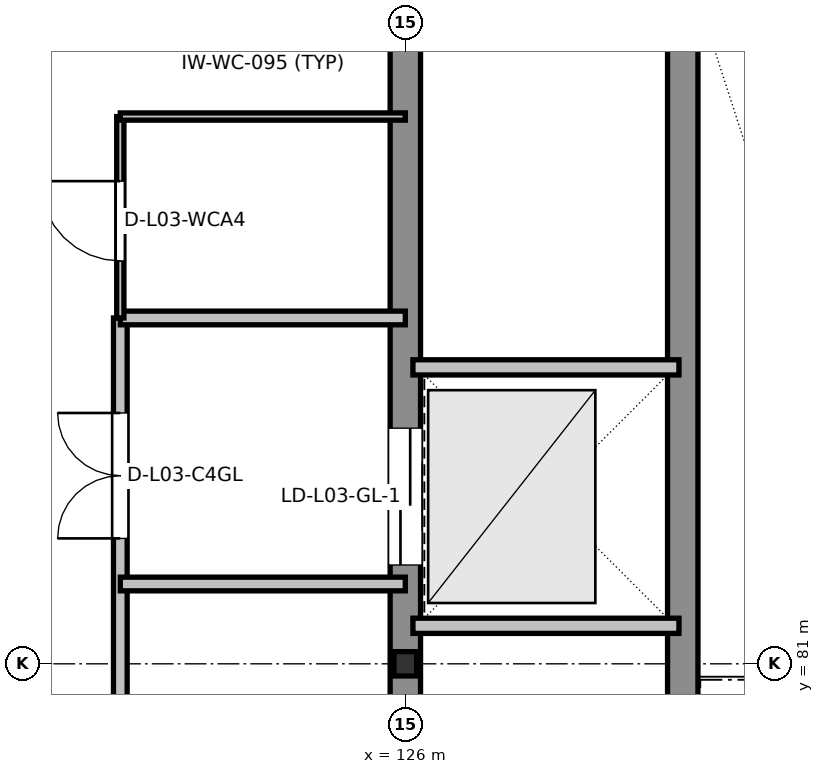
"""IFC4 building model, lengths in metres.
Left out: names, types, materials, properties, quantities, classifications, styles, units other than length and angle.
Written with IfcOpenShell. Run it as: python <this file> out.ifc"""

import sys

from ifc_helpers import new_model, si_unit, direction, frame, frame_2d, origin, origin_2d, place, context, subcontext, project, spatial, rectangle, i_section, extrude, element, fill, save


model = new_model("IFC4")
c1 = context("Model", 3, precision=1e-05, world=origin(), true_north=direction((0.0, 1.0)))
c2 = subcontext(c1, "Body", "Model", "MODEL_VIEW")
j1 = project(units=[si_unit("LENGTHUNIT", "METRE"), si_unit("PLANEANGLEUNIT", "RADIAN")], contexts=[c1])
p1 = place(None, origin())
s1 = spatial("IfcSite", under=j1, at=p1, CompositionType="ELEMENT")
p2 = place(p1, origin())
s2 = spatial("IfcBuilding", under=s1, at=p2, CompositionType="ELEMENT")
p3 = place(p2, frame((0.0, 0.0, 15.0)))
s3 = spatial("IfcBuildingStorey", under=s2, at=p3, CompositionType="ELEMENT", Elevation=15.0)
p4 = place(p3, frame((126.0, 81.0, 0.0), z_axis=(0.0, 0.0, 1.0), x_axis=(1.0, 0.0, 0.0)))
e1 = element("IfcColumn", 1, at=p4, inside=s3, PredefinedType="COLUMN", context=c2, shape_type="SweptSolid", body=[
    extrude(i_section(OverallWidth=0.3, OverallDepth=0.32, WebThickness=0.011, FlangeThickness=0.021, at=origin_2d()), origin(), (0.0, 0.0, 1.0), 4.2),
])
p5 = place(p3, frame((126.0, 90.0, 0.0), z_axis=(0.0, 0.0, 1.0), x_axis=(0.0, -1.0, 0.0)))
e2 = element("IfcWall", 2, at=p5, inside=s3, PredefinedType="SHEAR", context=c2, shape_type="SweptSolid", body=[
    extrude(rectangle(XDim=18.0, YDim=0.4, at=frame_2d((9.0, 0.0))), origin(), (0.0, 0.0, 1.0), 3.96),
])
p6 = place(p5, frame((16.1, 0.0, 0.0)))
e3 = element("IfcOpeningElement", 3, at=p6, cuts=e2, PredefinedType="OPENING", context=c2, shape_type="SweptSolid", body=[
    extrude(rectangle(XDim=1.1, YDim=2.16, at=frame_2d((0.55, 1.08))), frame((0.0, 0.21, 0.0), z_axis=(0.0, -1.0, 0.0), x_axis=(1.0, 0.0, 0.0)), (0.0, 0.0, 1.0), 0.42),
])
p7 = place(p5, frame((13.45, 0.0, 0.0)))
e4 = element("IfcOpeningElement", 4, at=p7, cuts=e2, PredefinedType="OPENING", context=c2, shape_type="SweptSolid", body=[
    extrude(rectangle(XDim=1.2, YDim=2.2, at=frame_2d((0.6, 1.1))), frame((0.0, 0.21, 0.0), z_axis=(0.0, -1.0, 0.0), x_axis=(1.0, 0.0, 0.0)), (0.0, 0.0, 1.0), 0.42),
])
p8 = place(p5, frame((10.65, 0.0, 0.0)))
e5 = element("IfcOpeningElement", 5, at=p8, cuts=e2, PredefinedType="OPENING", context=c2, shape_type="SweptSolid", body=[
    extrude(rectangle(XDim=1.2, YDim=2.2, at=frame_2d((0.6, 1.1))), frame((0.0, 0.21, 0.0), z_axis=(0.0, -1.0, 0.0), x_axis=(1.0, 0.0, 0.0)), (0.0, 0.0, 1.0), 0.42),
])
p9 = place(p5, frame((5.9, 0.0, 0.0)))
e6 = element("IfcOpeningElement", 6, at=p9, cuts=e2, PredefinedType="OPENING", context=c2, shape_type="SweptSolid", body=[
    extrude(rectangle(XDim=1.8, YDim=2.35, at=frame_2d((0.9, 1.175))), frame((0.0, 0.21, 0.0), z_axis=(0.0, -1.0, 0.0), x_axis=(1.0, 0.0, 0.0)), (0.0, 0.0, 1.0), 0.42),
])
p10 = place(p3, frame((129.65, 72.0, 0.0), z_axis=(0.0, 0.0, 1.0), x_axis=(0.0, 1.0, 0.0)))
e7 = element("IfcWall", 7, at=p10, inside=s3, PredefinedType="SHEAR", context=c2, shape_type="SweptSolid", body=[
    extrude(rectangle(XDim=18.0, YDim=0.4, at=frame_2d((9.0, 0.0))), origin(), (0.0, 0.0, 1.0), 3.96),
])
p11 = place(p10, frame((0.7, 0.0, 0.0)))
e8 = element("IfcOpeningElement", 8, at=p11, cuts=e7, PredefinedType="OPENING", context=c2, shape_type="SweptSolid", body=[
    extrude(rectangle(XDim=1.1, YDim=2.16, at=frame_2d((0.55, 1.08))), frame((0.0, 0.21, 0.0), z_axis=(0.0, -1.0, 0.0), x_axis=(1.0, 0.0, 0.0)), (0.0, 0.0, 1.0), 0.42),
])
for number, where, z_axis, x_axis in (
    (9, (126.1, 81.5, 0.0), (0.0, 0.0, 1.0), (1.0, 0.0, 0.0)),
    (10, (126.1, 84.9, 0.0), (0.0, 0.0, 1.0), (1.0, 0.0, 0.0)),
):
    element("IfcWall", number, at=place(p3, frame(where, z_axis=z_axis, x_axis=x_axis)), inside=s3, PredefinedType="PARTITIONING", context=c2, shape_type="SweptSolid", body=[
        extrude(rectangle(XDim=3.5, YDim=0.2, at=frame_2d((1.75, 0.0))), origin(), (0.0, 0.0, 1.0), 3.96),
    ])
p12 = place(p3, frame((122.25, 72.0, 0.0), z_axis=(0.0, 0.0, 1.0), x_axis=(0.0, 1.0, 0.0)))
e11 = element("IfcWall", 11, at=p12, inside=s3, PredefinedType="PARTITIONING", context=c2, shape_type="SweptSolid", body=[
    extrude(rectangle(XDim=13.55, YDim=0.18, at=frame_2d((6.775, 0.0))), origin(), (0.0, 0.0, 1.0), 3.96),
])
p13 = place(p12, frame((0.75, 0.0, 0.0)))
e12 = element("IfcOpeningElement", 12, at=p13, cuts=e11, PredefinedType="OPENING", context=c2, shape_type="SweptSolid", body=[
    extrude(rectangle(XDim=1.1, YDim=2.16, at=frame_2d((0.55, 1.08))), frame((0.0, 0.1, 0.0), z_axis=(0.0, -1.0, 0.0), x_axis=(1.0, 0.0, 0.0)), (0.0, 0.0, 1.0), 0.2),
])
p14 = place(p12, frame((3.2, 0.0, 0.0)))
e13 = element("IfcOpeningElement", 13, at=p14, cuts=e11, PredefinedType="OPENING", context=c2, shape_type="SweptSolid", body=[
    extrude(rectangle(XDim=1.4, YDim=2.2, at=frame_2d((0.7, 1.1))), frame((0.0, 0.1, 0.0), z_axis=(0.0, -1.0, 0.0), x_axis=(1.0, 0.0, 0.0)), (0.0, 0.0, 1.0), 0.2),
])
p15 = place(p12, frame((6.65, 0.0, 0.0)))
e14 = element("IfcOpeningElement", 14, at=p15, cuts=e11, PredefinedType="OPENING", context=c2, shape_type="SweptSolid", body=[
    extrude(rectangle(XDim=1.4, YDim=2.2, at=frame_2d((0.7, 1.1))), frame((0.0, 0.1, 0.0), z_axis=(0.0, -1.0, 0.0), x_axis=(1.0, 0.0, 0.0)), (0.0, 0.0, 1.0), 0.2),
])
p16 = place(p12, frame((10.65, 0.0, 0.0)))
e15 = element("IfcOpeningElement", 15, at=p16, cuts=e11, PredefinedType="OPENING", context=c2, shape_type="SweptSolid", body=[
    extrude(rectangle(XDim=1.65, YDim=2.25, at=frame_2d((0.825, 1.125))), frame((0.0, 0.1, 0.0), z_axis=(0.0, -1.0, 0.0), x_axis=(1.0, 0.0, 0.0)), (0.0, 0.0, 1.0), 0.2),
])
for number, where, z_axis, x_axis in (
    (16, (122.25, 82.05, 0.0), (0.0, 0.0, 1.0), (1.0, 0.0, 0.0)),
    (17, (122.25, 85.55, 0.0), (0.0, 0.0, 1.0), (1.0, 0.0, 0.0)),
):
    element("IfcWall", number, at=place(p3, frame(where, z_axis=z_axis, x_axis=x_axis)), inside=s3, PredefinedType="PARTITIONING", context=c2, shape_type="SweptSolid", body=[
        extrude(rectangle(XDim=3.75, YDim=0.18, at=frame_2d((1.875, 0.0))), origin(), (0.0, 0.0, 1.0), 3.96),
    ])
p17 = place(p3, frame((122.25, 85.55, 0.0), z_axis=(0.0, 0.0, 1.0), x_axis=(0.0, 1.0, 0.0)))
e18 = element("IfcWall", 18, at=p17, inside=s3, PredefinedType="PARTITIONING", context=c2, shape_type="SweptSolid", body=[
    extrude(rectangle(XDim=2.65, YDim=0.095, at=frame_2d((1.325, 0.0))), origin(), (0.0, 0.0, 1.0), 3.96),
])
p18 = place(p17, frame((0.75, 0.0, 0.0)))
e19 = element("IfcOpeningElement", 19, at=p18, cuts=e18, PredefinedType="OPENING", context=c2, shape_type="SweptSolid", body=[
    extrude(rectangle(XDim=1.05, YDim=2.13, at=frame_2d((0.525, 1.065))), frame((0.0, 0.057, 0.0), z_axis=(0.0, -1.0, 0.0), x_axis=(1.0, 0.0, 0.0)), (0.0, 0.0, 1.0), 0.115),
])
p19 = place(p3, frame((122.25, 88.2, 0.0), z_axis=(0.0, 0.0, 1.0), x_axis=(1.0, 0.0, 0.0)))
e20 = element("IfcWall", 20, at=p19, inside=s3, PredefinedType="PARTITIONING", context=c2, shape_type="SweptSolid", body=[
    extrude(rectangle(XDim=3.75, YDim=0.095, at=frame_2d((1.875, 0.0))), origin(), (0.0, 0.0, 1.0), 3.96),
])
p20 = place(p9, origin())
e21 = element("IfcDoor", 21, at=p20, inside=s3, OperationType="DOUBLE_DOOR_SLIDING", PredefinedType="DOOR", context=c2, shape_type="SweptSolid", body=[
    extrude(rectangle(XDim=1.8, YDim=2.35, at=frame_2d((0.9, 1.175))), frame((0.0, 0.025, 0.0), z_axis=(0.0, -1.0, 0.0), x_axis=(1.0, 0.0, 0.0)), (0.0, 0.0, 1.0), 0.05),
])
fill(e6, e21)
p21 = place(p16, origin())
e22 = element("IfcDoor", 22, at=p21, inside=s3, OperationType="DOUBLE_DOOR_SINGLE_SWING", PredefinedType="DOOR", context=c2, shape_type="SweptSolid", body=[
    extrude(rectangle(XDim=1.65, YDim=2.25, at=frame_2d((0.825, 1.125))), frame((0.0, 0.025, 0.0), z_axis=(0.0, -1.0, 0.0), x_axis=(1.0, 0.0, 0.0)), (0.0, 0.0, 1.0), 0.05),
])
fill(e15, e22)
p22 = place(p18, origin())
e23 = element("IfcDoor", 23, at=p22, inside=s3, OperationType="SINGLE_SWING_RIGHT", PredefinedType="DOOR", context=c2, shape_type="SweptSolid", body=[
    extrude(rectangle(XDim=1.05, YDim=2.13, at=frame_2d((0.525, 1.065))), frame((0.0, 0.025, 0.0), z_axis=(0.0, -1.0, 0.0), x_axis=(1.0, 0.0, 0.0)), (0.0, 0.0, 1.0), 0.05),
])
fill(e19, e23)
save(model, sys.argv[1])
